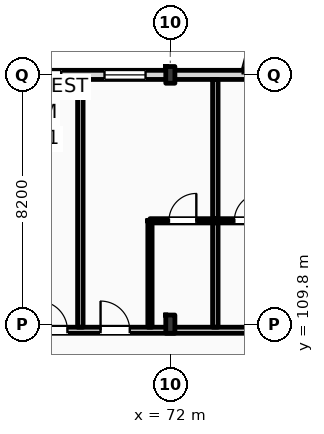
"""IFC4 building model, lengths in metres.
Left out: names, types, materials, properties, quantities, classifications, styles, units other than length and angle.
Written with IfcOpenShell. Run it as: python <this file> out.ifc"""

import sys

from ifc_helpers import new_model, si_unit, direction, frame, frame_2d, origin, origin_2d, place, context, subcontext, project, spatial, rectangle, i_section, extrude, element, fill, save


model = new_model("IFC4")
c1 = context("Model", 3, precision=1e-05, world=origin(), true_north=direction((0.0, 1.0)))
c2 = subcontext(c1, "Body", "Model", "MODEL_VIEW")
j1 = project(units=[si_unit("LENGTHUNIT", "METRE"), si_unit("PLANEANGLEUNIT", "RADIAN")], contexts=[c1])
p1 = place(None, origin())
s1 = spatial("IfcSite", under=j1, at=p1, CompositionType="ELEMENT")
p2 = place(p1, origin())
s2 = spatial("IfcBuilding", under=s1, at=p2, CompositionType="ELEMENT")
p3 = place(p2, frame((0.0, 0.0, 20.4)))
s3 = spatial("IfcBuildingStorey", under=s2, at=p3, CompositionType="ELEMENT", Elevation=20.4)
p4 = place(p3, frame((72.0, 109.8, 0.0), z_axis=(0.0, 0.0, 1.0), x_axis=(1.0, 0.0, 0.0)))
e1 = element("IfcColumn", 1, at=p4, inside=s3, PredefinedType="COLUMN", context=c2, shape_type="SweptSolid", body=[
    extrude(i_section(OverallWidth=0.3, OverallDepth=0.6, WebThickness=0.015, FlangeThickness=0.03, FilletRadius=0.027, at=origin_2d()), origin(), (0.0, 0.0, 1.0), 4.2),
])
p5 = place(p3, frame((72.0, 118.0, 0.0), z_axis=(0.0, 0.0, 1.0), x_axis=(1.0, 0.0, 0.0)))
e2 = element("IfcColumn", 2, at=p5, inside=s3, PredefinedType="COLUMN", context=c2, shape_type="SweptSolid", body=[
    extrude(i_section(OverallWidth=0.3, OverallDepth=0.55, WebThickness=0.015, FlangeThickness=0.029, FilletRadius=0.027, at=origin_2d()), origin(), (0.0, 0.0, 1.0), 4.2),
])
p6 = place(p3, frame((22.5, 118.0, 0.0), z_axis=(0.0, 0.0, 1.0), x_axis=(1.0, 0.0, 0.0)))
e3 = element("IfcWall", 3, at=p6, inside=s3, PredefinedType="STANDARD", context=c2, shape_type="SweptSolid", body=[
    extrude(rectangle(XDim=97.5, YDim=0.3, at=frame_2d((48.75, 0.0))), origin(), (0.0, 0.0, 1.0), 3.38),
])
p7 = place(p6, frame((0.91, 0.0, 0.9)))
e4 = element("IfcOpeningElement", 4, at=p7, cuts=e3, PredefinedType="OPENING", context=c2, shape_type="SweptSolid", body=[
    extrude(rectangle(XDim=0.9, YDim=1.8, at=frame_2d((0.45, 0.9))), frame((0.0, 0.16, 0.0), z_axis=(0.0, -1.0, 0.0), x_axis=(1.0, 0.0, 0.0)), (0.0, 0.0, 1.0), 0.32),
])
p8 = place(p6, frame((6.36, 0.0, 0.0)))
e5 = element("IfcOpeningElement", 5, at=p8, cuts=e3, PredefinedType="OPENING", context=c2, shape_type="SweptSolid", body=[
    extrude(rectangle(XDim=1.2, YDim=2.25, at=frame_2d((0.6, 1.125))), frame((0.0, 0.16, 0.0), z_axis=(0.0, -1.0, 0.0), x_axis=(1.0, 0.0, 0.0)), (0.0, 0.0, 1.0), 0.32),
])
p9 = place(p6, frame((11.41, 0.0, 0.9)))
e6 = element("IfcOpeningElement", 6, at=p9, cuts=e3, PredefinedType="OPENING", context=c2, shape_type="SweptSolid", body=[
    extrude(rectangle(XDim=1.1, YDim=1.9, at=frame_2d((0.55, 0.95))), frame((0.0, 0.16, 0.0), z_axis=(0.0, -1.0, 0.0), x_axis=(1.0, 0.0, 0.0)), (0.0, 0.0, 1.0), 0.32),
])
p10 = place(p6, frame((14.335, 0.0, 0.9)))
e7 = element("IfcOpeningElement", 7, at=p10, cuts=e3, PredefinedType="OPENING", context=c2, shape_type="SweptSolid", body=[
    extrude(rectangle(XDim=1.65, YDim=1.95, at=frame_2d((0.825, 0.975))), frame((0.0, 0.16, 0.0), z_axis=(0.0, -1.0, 0.0), x_axis=(1.0, 0.0, 0.0)), (0.0, 0.0, 1.0), 0.32),
])
p11 = place(p6, frame((19.26, 0.0, 0.9)))
e8 = element("IfcOpeningElement", 8, at=p11, cuts=e3, PredefinedType="OPENING", context=c2, shape_type="SweptSolid", body=[
    extrude(rectangle(XDim=1.35, YDim=2.0, at=frame_2d((0.675, 1.0))), frame((0.0, 0.16, 0.0), z_axis=(0.0, -1.0, 0.0), x_axis=(1.0, 0.0, 0.0)), (0.0, 0.0, 1.0), 0.32),
])
p12 = place(p6, frame((22.8, 0.0, 0.0)))
e9 = element("IfcOpeningElement", 9, at=p12, cuts=e3, PredefinedType="OPENING", context=c2, shape_type="SweptSolid", body=[
    extrude(rectangle(XDim=1.2, YDim=2.25, at=frame_2d((0.6, 1.125))), frame((0.0, 0.16, 0.0), z_axis=(0.0, -1.0, 0.0), x_axis=(1.0, 0.0, 0.0)), (0.0, 0.0, 1.0), 0.32),
])
p13 = place(p6, frame((26.91, 0.0, 0.9)))
e10 = element("IfcOpeningElement", 10, at=p13, cuts=e3, PredefinedType="OPENING", context=c2, shape_type="SweptSolid", body=[
    extrude(rectangle(XDim=2.1, YDim=2.1, at=frame_2d((1.05, 1.05))), frame((0.0, 0.16, 0.0), z_axis=(0.0, -1.0, 0.0), x_axis=(1.0, 0.0, 0.0)), (0.0, 0.0, 1.0), 0.32),
])
p14 = place(p6, frame((30.835, 0.0, 0.9)))
e11 = element("IfcOpeningElement", 11, at=p14, cuts=e3, PredefinedType="OPENING", context=c2, shape_type="SweptSolid", body=[
    extrude(rectangle(XDim=2.25, YDim=2.15, at=frame_2d((1.125, 1.075))), frame((0.0, 0.16, 0.0), z_axis=(0.0, -1.0, 0.0), x_axis=(1.0, 0.0, 0.0)), (0.0, 0.0, 1.0), 0.32),
])
p15 = place(p6, frame((34.96, 0.0, 0.9)))
e12 = element("IfcOpeningElement", 12, at=p15, cuts=e3, PredefinedType="OPENING", context=c2, shape_type="SweptSolid", body=[
    extrude(rectangle(XDim=2.4, YDim=2.2, at=frame_2d((1.2, 1.1))), frame((0.0, 0.16, 0.0), z_axis=(0.0, -1.0, 0.0), x_axis=(1.0, 0.0, 0.0)), (0.0, 0.0, 1.0), 0.32),
])
p16 = place(p6, frame((39.0, 0.0, 0.0)))
e13 = element("IfcOpeningElement", 13, at=p16, cuts=e3, PredefinedType="OPENING", context=c2, shape_type="SweptSolid", body=[
    extrude(rectangle(XDim=1.2, YDim=2.25, at=frame_2d((0.6, 1.125))), frame((0.0, 0.16, 0.0), z_axis=(0.0, -1.0, 0.0), x_axis=(1.0, 0.0, 0.0)), (0.0, 0.0, 1.0), 0.32),
])
p17 = place(p6, frame((43.21, 0.0, 0.9)))
e14 = element("IfcOpeningElement", 14, at=p17, cuts=e3, PredefinedType="OPENING", context=c2, shape_type="SweptSolid", body=[
    extrude(rectangle(XDim=2.7, YDim=2.3, at=frame_2d((1.35, 1.15))), frame((0.0, 0.16, 0.0), z_axis=(0.0, -1.0, 0.0), x_axis=(1.0, 0.0, 0.0)), (0.0, 0.0, 1.0), 0.32),
])
p18 = place(p6, frame((47.335, 0.0, 0.9)))
e15 = element("IfcOpeningElement", 15, at=p18, cuts=e3, PredefinedType="OPENING", context=c2, shape_type="SweptSolid", body=[
    extrude(rectangle(XDim=1.35, YDim=2.3, at=frame_2d((0.675, 1.15))), frame((0.0, 0.16, 0.0), z_axis=(0.0, -1.0, 0.0), x_axis=(1.0, 0.0, 0.0)), (0.0, 0.0, 1.0), 0.32),
])
p19 = place(p6, frame((52.74, 0.0, 0.0)))
e16 = element("IfcOpeningElement", 16, at=p19, cuts=e3, PredefinedType="OPENING", context=c2, shape_type="SweptSolid", body=[
    extrude(rectangle(XDim=1.2, YDim=2.25, at=frame_2d((0.6, 1.125))), frame((0.0, 0.16, 0.0), z_axis=(0.0, -1.0, 0.0), x_axis=(1.0, 0.0, 0.0)), (0.0, 0.0, 1.0), 0.32),
])
p20 = place(p6, frame((55.36, 0.0, 0.9)))
e17 = element("IfcOpeningElement", 17, at=p20, cuts=e3, PredefinedType="OPENING", context=c2, shape_type="SweptSolid", body=[
    extrude(rectangle(XDim=1.1, YDim=2.3, at=frame_2d((0.55, 1.15))), frame((0.0, 0.16, 0.0), z_axis=(0.0, -1.0, 0.0), x_axis=(1.0, 0.0, 0.0)), (0.0, 0.0, 1.0), 0.32),
])
p21 = place(p6, frame((59.99, 0.0, 0.9)))
e18 = element("IfcOpeningElement", 18, at=p21, cuts=e3, PredefinedType="OPENING", context=c2, shape_type="SweptSolid", body=[
    extrude(rectangle(XDim=2.74, YDim=2.3, at=frame_2d((1.37, 1.15))), frame((0.0, 0.16, 0.0), z_axis=(0.0, -1.0, 0.0), x_axis=(1.0, 0.0, 0.0)), (0.0, 0.0, 1.0), 0.32),
])
p22 = place(p6, frame((65.95, 0.0, 0.9)))
e19 = element("IfcOpeningElement", 19, at=p22, cuts=e3, PredefinedType="OPENING", context=c2, shape_type="SweptSolid", body=[
    extrude(rectangle(XDim=1.35, YDim=2.3, at=frame_2d((0.675, 1.15))), frame((0.0, 0.16, 0.0), z_axis=(0.0, -1.0, 0.0), x_axis=(1.0, 0.0, 0.0)), (0.0, 0.0, 1.0), 0.32),
])
p23 = place(p6, frame((69.16, 0.0, 0.0)))
e20 = element("IfcOpeningElement", 20, at=p23, cuts=e3, PredefinedType="OPENING", context=c2, shape_type="SweptSolid", body=[
    extrude(rectangle(XDim=1.2, YDim=2.25, at=frame_2d((0.6, 1.125))), frame((0.0, 0.16, 0.0), z_axis=(0.0, -1.0, 0.0), x_axis=(1.0, 0.0, 0.0)), (0.0, 0.0, 1.0), 0.32),
])
p24 = place(p6, frame((73.75, 0.0, 0.9)))
e21 = element("IfcOpeningElement", 21, at=p24, cuts=e3, PredefinedType="OPENING", context=c2, shape_type="SweptSolid", body=[
    extrude(rectangle(XDim=1.8, YDim=2.3, at=frame_2d((0.9, 1.15))), frame((0.0, 0.16, 0.0), z_axis=(0.0, -1.0, 0.0), x_axis=(1.0, 0.0, 0.0)), (0.0, 0.0, 1.0), 0.32),
])
p25 = place(p6, frame((76.79, 0.0, 0.9)))
e22 = element("IfcOpeningElement", 22, at=p25, cuts=e3, PredefinedType="OPENING", context=c2, shape_type="SweptSolid", body=[
    extrude(rectangle(XDim=2.74, YDim=2.3, at=frame_2d((1.37, 1.15))), frame((0.0, 0.16, 0.0), z_axis=(0.0, -1.0, 0.0), x_axis=(1.0, 0.0, 0.0)), (0.0, 0.0, 1.0), 0.32),
])
p26 = place(p6, frame((81.55, 0.0, 0.9)))
e23 = element("IfcOpeningElement", 23, at=p26, cuts=e3, PredefinedType="OPENING", context=c2, shape_type="SweptSolid", body=[
    extrude(rectangle(XDim=1.8, YDim=2.3, at=frame_2d((0.9, 1.15))), frame((0.0, 0.16, 0.0), z_axis=(0.0, -1.0, 0.0), x_axis=(1.0, 0.0, 0.0)), (0.0, 0.0, 1.0), 0.32),
])
p27 = place(p6, frame((86.01, 0.0, 0.9)))
e24 = element("IfcOpeningElement", 24, at=p27, cuts=e3, PredefinedType="OPENING", context=c2, shape_type="SweptSolid", body=[
    extrude(rectangle(XDim=1.1, YDim=1.5, at=frame_2d((0.55, 0.75))), frame((0.0, 0.16, 0.0), z_axis=(0.0, -1.0, 0.0), x_axis=(1.0, 0.0, 0.0)), (0.0, 0.0, 1.0), 0.32),
])
p28 = place(p6, frame((90.135, 0.0, 0.9)))
e25 = element("IfcOpeningElement", 25, at=p28, cuts=e3, PredefinedType="OPENING", context=c2, shape_type="SweptSolid", body=[
    extrude(rectangle(XDim=1.25, YDim=1.6, at=frame_2d((0.625, 0.8))), frame((0.0, 0.16, 0.0), z_axis=(0.0, -1.0, 0.0), x_axis=(1.0, 0.0, 0.0)), (0.0, 0.0, 1.0), 0.32),
])
p29 = place(p6, frame((94.34, 0.0, 0.9)))
e26 = element("IfcOpeningElement", 26, at=p29, cuts=e3, PredefinedType="OPENING", context=c2, shape_type="SweptSolid", body=[
    extrude(rectangle(XDim=1.4, YDim=1.7, at=frame_2d((0.7, 0.85))), frame((0.0, 0.16, 0.0), z_axis=(0.0, -1.0, 0.0), x_axis=(1.0, 0.0, 0.0)), (0.0, 0.0, 1.0), 0.32),
])
p30 = place(p3, frame((10.65, 109.6, 0.0), z_axis=(0.0, 0.0, 1.0), x_axis=(1.0, 0.0, 0.0)))
e27 = element("IfcWall", 27, at=p30, inside=s3, PredefinedType="PARTITIONING", context=c2, shape_type="SweptSolid", body=[
    extrude(rectangle(XDim=109.21, YDim=0.2, at=frame_2d((54.605, 0.0))), origin(), (0.0, 0.0, 1.0), 3.38),
])
p31 = place(p30, frame((12.535, 0.0, 0.0)))
e28 = element("IfcOpeningElement", 28, at=p31, cuts=e27, PredefinedType="OPENING", context=c2, shape_type="SweptSolid", body=[
    extrude(rectangle(XDim=1.02, YDim=2.2, at=frame_2d((0.51, 1.1))), frame((0.0, 0.11, 0.0), z_axis=(0.0, -1.0, 0.0), x_axis=(1.0, 0.0, 0.0)), (0.0, 0.0, 1.0), 0.22),
])
p32 = place(p30, frame((19.175, 0.0, 0.0)))
e29 = element("IfcOpeningElement", 29, at=p32, cuts=e27, PredefinedType="OPENING", context=c2, shape_type="SweptSolid", body=[
    extrude(rectangle(XDim=1.02, YDim=2.2, at=frame_2d((0.51, 1.1))), frame((0.0, 0.11, 0.0), z_axis=(0.0, -1.0, 0.0), x_axis=(1.0, 0.0, 0.0)), (0.0, 0.0, 1.0), 0.22),
])
p33 = place(p30, frame((23.375, 0.0, 0.0)))
e30 = element("IfcOpeningElement", 30, at=p33, cuts=e27, PredefinedType="OPENING", context=c2, shape_type="SweptSolid", body=[
    extrude(rectangle(XDim=1.02, YDim=2.2, at=frame_2d((0.51, 1.1))), frame((0.0, 0.11, 0.0), z_axis=(0.0, -1.0, 0.0), x_axis=(1.0, 0.0, 0.0)), (0.0, 0.0, 1.0), 0.22),
])
p34 = place(p30, frame((27.575, 0.0, 0.0)))
e31 = element("IfcOpeningElement", 31, at=p34, cuts=e27, PredefinedType="OPENING", context=c2, shape_type="SweptSolid", body=[
    extrude(rectangle(XDim=1.02, YDim=2.2, at=frame_2d((0.51, 1.1))), frame((0.0, 0.11, 0.0), z_axis=(0.0, -1.0, 0.0), x_axis=(1.0, 0.0, 0.0)), (0.0, 0.0, 1.0), 0.22),
])
p35 = place(p30, frame((31.805, 0.0, 0.0)))
e32 = element("IfcOpeningElement", 32, at=p35, cuts=e27, PredefinedType="OPENING", context=c2, shape_type="SweptSolid", body=[
    extrude(rectangle(XDim=0.96, YDim=2.2, at=frame_2d((0.48, 1.1))), frame((0.0, 0.11, 0.0), z_axis=(0.0, -1.0, 0.0), x_axis=(1.0, 0.0, 0.0)), (0.0, 0.0, 1.0), 0.22),
])
p36 = place(p30, frame((33.855, 0.0, 0.0)))
e33 = element("IfcOpeningElement", 33, at=p36, cuts=e27, PredefinedType="OPENING", context=c2, shape_type="SweptSolid", body=[
    extrude(rectangle(XDim=0.96, YDim=2.2, at=frame_2d((0.48, 1.1))), frame((0.0, 0.11, 0.0), z_axis=(0.0, -1.0, 0.0), x_axis=(1.0, 0.0, 0.0)), (0.0, 0.0, 1.0), 0.22),
])
p37 = place(p30, frame((40.205, 0.0, 0.0)))
e34 = element("IfcOpeningElement", 34, at=p37, cuts=e27, PredefinedType="OPENING", context=c2, shape_type="SweptSolid", body=[
    extrude(rectangle(XDim=0.96, YDim=2.2, at=frame_2d((0.48, 1.1))), frame((0.0, 0.11, 0.0), z_axis=(0.0, -1.0, 0.0), x_axis=(1.0, 0.0, 0.0)), (0.0, 0.0, 1.0), 0.22),
])
p38 = place(p30, frame((42.255, 0.0, 0.0)))
e35 = element("IfcOpeningElement", 35, at=p38, cuts=e27, PredefinedType="OPENING", context=c2, shape_type="SweptSolid", body=[
    extrude(rectangle(XDim=0.96, YDim=2.2, at=frame_2d((0.48, 1.1))), frame((0.0, 0.11, 0.0), z_axis=(0.0, -1.0, 0.0), x_axis=(1.0, 0.0, 0.0)), (0.0, 0.0, 1.0), 0.22),
])
p39 = place(p30, frame((48.605, 0.0, 0.0)))
e36 = element("IfcOpeningElement", 36, at=p39, cuts=e27, PredefinedType="OPENING", context=c2, shape_type="SweptSolid", body=[
    extrude(rectangle(XDim=0.96, YDim=2.2, at=frame_2d((0.48, 1.1))), frame((0.0, 0.11, 0.0), z_axis=(0.0, -1.0, 0.0), x_axis=(1.0, 0.0, 0.0)), (0.0, 0.0, 1.0), 0.22),
])
p40 = place(p30, frame((50.655, 0.0, 0.0)))
e37 = element("IfcOpeningElement", 37, at=p40, cuts=e27, PredefinedType="OPENING", context=c2, shape_type="SweptSolid", body=[
    extrude(rectangle(XDim=0.96, YDim=2.2, at=frame_2d((0.48, 1.1))), frame((0.0, 0.11, 0.0), z_axis=(0.0, -1.0, 0.0), x_axis=(1.0, 0.0, 0.0)), (0.0, 0.0, 1.0), 0.22),
])
p41 = place(p30, frame((57.005, 0.0, 0.0)))
e38 = element("IfcOpeningElement", 38, at=p41, cuts=e27, PredefinedType="OPENING", context=c2, shape_type="SweptSolid", body=[
    extrude(rectangle(XDim=0.96, YDim=2.2, at=frame_2d((0.48, 1.1))), frame((0.0, 0.11, 0.0), z_axis=(0.0, -1.0, 0.0), x_axis=(1.0, 0.0, 0.0)), (0.0, 0.0, 1.0), 0.22),
])
p42 = place(p30, frame((59.055, 0.0, 0.0)))
e39 = element("IfcOpeningElement", 39, at=p42, cuts=e27, PredefinedType="OPENING", context=c2, shape_type="SweptSolid", body=[
    extrude(rectangle(XDim=0.96, YDim=2.2, at=frame_2d((0.48, 1.1))), frame((0.0, 0.11, 0.0), z_axis=(0.0, -1.0, 0.0), x_axis=(1.0, 0.0, 0.0)), (0.0, 0.0, 1.0), 0.22),
])
p43 = place(p30, frame((65.405, 0.0, 0.0)))
e40 = element("IfcOpeningElement", 40, at=p43, cuts=e27, PredefinedType="OPENING", context=c2, shape_type="SweptSolid", body=[
    extrude(rectangle(XDim=0.96, YDim=2.2, at=frame_2d((0.48, 1.1))), frame((0.0, 0.11, 0.0), z_axis=(0.0, -1.0, 0.0), x_axis=(1.0, 0.0, 0.0)), (0.0, 0.0, 1.0), 0.22),
])
p44 = place(p30, frame((67.205, 0.0, 0.0)))
e41 = element("IfcOpeningElement", 41, at=p44, cuts=e27, PredefinedType="OPENING", context=c2, shape_type="SweptSolid", body=[
    extrude(rectangle(XDim=0.96, YDim=2.2, at=frame_2d((0.48, 1.1))), frame((0.0, 0.11, 0.0), z_axis=(0.0, -1.0, 0.0), x_axis=(1.0, 0.0, 0.0)), (0.0, 0.0, 1.0), 0.22),
])
p45 = place(p30, frame((73.805, 0.0, 0.0)))
e42 = element("IfcOpeningElement", 42, at=p45, cuts=e27, PredefinedType="OPENING", context=c2, shape_type="SweptSolid", body=[
    extrude(rectangle(XDim=0.96, YDim=2.2, at=frame_2d((0.48, 1.1))), frame((0.0, 0.11, 0.0), z_axis=(0.0, -1.0, 0.0), x_axis=(1.0, 0.0, 0.0)), (0.0, 0.0, 1.0), 0.22),
])
p46 = place(p30, frame((78.255, 0.0, 0.0)))
e43 = element("IfcOpeningElement", 43, at=p46, cuts=e27, PredefinedType="OPENING", context=c2, shape_type="SweptSolid", body=[
    extrude(rectangle(XDim=0.96, YDim=2.2, at=frame_2d((0.48, 1.1))), frame((0.0, 0.11, 0.0), z_axis=(0.0, -1.0, 0.0), x_axis=(1.0, 0.0, 0.0)), (0.0, 0.0, 1.0), 0.22),
])
p47 = place(p30, frame((82.205, 0.0, 0.0)))
e44 = element("IfcOpeningElement", 44, at=p47, cuts=e27, PredefinedType="OPENING", context=c2, shape_type="SweptSolid", body=[
    extrude(rectangle(XDim=0.96, YDim=2.2, at=frame_2d((0.48, 1.1))), frame((0.0, 0.11, 0.0), z_axis=(0.0, -1.0, 0.0), x_axis=(1.0, 0.0, 0.0)), (0.0, 0.0, 1.0), 0.22),
])
p48 = place(p30, frame((86.405, 0.0, 0.0)))
e45 = element("IfcOpeningElement", 45, at=p48, cuts=e27, PredefinedType="OPENING", context=c2, shape_type="SweptSolid", body=[
    extrude(rectangle(XDim=0.96, YDim=2.2, at=frame_2d((0.48, 1.1))), frame((0.0, 0.11, 0.0), z_axis=(0.0, -1.0, 0.0), x_axis=(1.0, 0.0, 0.0)), (0.0, 0.0, 1.0), 0.22),
])
p49 = place(p30, frame((90.605, 0.0, 0.0)))
e46 = element("IfcOpeningElement", 46, at=p49, cuts=e27, PredefinedType="OPENING", context=c2, shape_type="SweptSolid", body=[
    extrude(rectangle(XDim=0.96, YDim=2.2, at=frame_2d((0.48, 1.1))), frame((0.0, 0.11, 0.0), z_axis=(0.0, -1.0, 0.0), x_axis=(1.0, 0.0, 0.0)), (0.0, 0.0, 1.0), 0.22),
])
p50 = place(p30, frame((94.805, 0.0, 0.0)))
e47 = element("IfcOpeningElement", 47, at=p50, cuts=e27, PredefinedType="OPENING", context=c2, shape_type="SweptSolid", body=[
    extrude(rectangle(XDim=0.96, YDim=2.2, at=frame_2d((0.48, 1.1))), frame((0.0, 0.11, 0.0), z_axis=(0.0, -1.0, 0.0), x_axis=(1.0, 0.0, 0.0)), (0.0, 0.0, 1.0), 0.22),
])
p51 = place(p30, frame((99.005, 0.0, 0.0)))
e48 = element("IfcOpeningElement", 48, at=p51, cuts=e27, PredefinedType="OPENING", context=c2, shape_type="SweptSolid", body=[
    extrude(rectangle(XDim=0.96, YDim=2.2, at=frame_2d((0.48, 1.1))), frame((0.0, 0.11, 0.0), z_axis=(0.0, -1.0, 0.0), x_axis=(1.0, 0.0, 0.0)), (0.0, 0.0, 1.0), 0.22),
])
p52 = place(p30, frame((103.205, 0.0, 0.0)))
e49 = element("IfcOpeningElement", 49, at=p52, cuts=e27, PredefinedType="OPENING", context=c2, shape_type="SweptSolid", body=[
    extrude(rectangle(XDim=0.96, YDim=2.2, at=frame_2d((0.48, 1.1))), frame((0.0, 0.11, 0.0), z_axis=(0.0, -1.0, 0.0), x_axis=(1.0, 0.0, 0.0)), (0.0, 0.0, 1.0), 0.22),
])
p53 = place(p30, frame((105.335, 0.0, 0.0)))
e50 = element("IfcOpeningElement", 50, at=p53, cuts=e27, PredefinedType="OPENING", context=c2, shape_type="SweptSolid", body=[
    extrude(rectangle(XDim=0.96, YDim=2.2, at=frame_2d((0.48, 1.1))), frame((0.0, 0.11, 0.0), z_axis=(0.0, -1.0, 0.0), x_axis=(1.0, 0.0, 0.0)), (0.0, 0.0, 1.0), 0.22),
])
p54 = place(p30, frame((2.716, 0.0, 0.0)))
e51 = element("IfcOpeningElement", 51, at=p54, cuts=e27, PredefinedType="OPENING", context=c2, shape_type="SweptSolid", body=[
    extrude(rectangle(XDim=1.35, YDim=2.25, at=frame_2d((0.675, 1.125))), frame((0.0, 0.11, 0.0), z_axis=(0.0, -1.0, 0.0), x_axis=(1.0, 0.0, 0.0)), (0.0, 0.0, 1.0), 0.22),
])
p55 = place(p30, frame((6.65, 0.0, 0.0)))
e52 = element("IfcOpeningElement", 52, at=p55, cuts=e27, PredefinedType="OPENING", context=c2, shape_type="SweptSolid", body=[
    extrude(rectangle(XDim=1.35, YDim=2.25, at=frame_2d((0.675, 1.125))), frame((0.0, 0.11, 0.0), z_axis=(0.0, -1.0, 0.0), x_axis=(1.0, 0.0, 0.0)), (0.0, 0.0, 1.0), 0.22),
])
p56 = place(p30, frame((10.583, 0.0, 0.0)))
e53 = element("IfcOpeningElement", 53, at=p56, cuts=e27, PredefinedType="OPENING", context=c2, shape_type="SweptSolid", body=[
    extrude(rectangle(XDim=1.35, YDim=2.25, at=frame_2d((0.675, 1.125))), frame((0.0, 0.11, 0.0), z_axis=(0.0, -1.0, 0.0), x_axis=(1.0, 0.0, 0.0)), (0.0, 0.0, 1.0), 0.22),
])
for number, where, z_axis, x_axis in (
    (54, (69.04, 109.7, 0.0), (0.0, 0.0, 1.0), (0.0, 1.0, 0.0)),
    (55, (73.48, 109.7, 0.0), (0.0, 0.0, 1.0), (0.0, 1.0, 0.0)),
):
    element("IfcWall", number, at=place(p3, frame(where, z_axis=z_axis, x_axis=x_axis)), inside=s3, PredefinedType="PARTITIONING", context=c2, shape_type="SweptSolid", body=[
        extrude(rectangle(XDim=8.15, YDim=0.18, at=frame_2d((4.075, 0.0))), origin(), (0.0, 0.0, 1.0), 3.94),
    ])
p57 = place(p3, frame((71.33, 109.7, 0.0), z_axis=(0.0, 0.0, 1.0), x_axis=(0.0, 1.0, 0.0)))
e56 = element("IfcWall", 56, at=p57, inside=s3, PredefinedType="PARTITIONING", context=c2, shape_type="SweptSolid", body=[
    extrude(rectangle(XDim=3.5, YDim=0.14, at=frame_2d((1.75, 0.0))), origin(), (0.0, 0.0, 1.0), 3.94),
])
p58 = place(p3, frame((71.33, 113.2, 0.0), z_axis=(0.0, 0.0, 1.0), x_axis=(1.0, 0.0, 0.0)))
e57 = element("IfcWall", 57, at=p58, inside=s3, PredefinedType="PARTITIONING", context=c2, shape_type="SweptSolid", body=[
    extrude(rectangle(XDim=2.15, YDim=0.14, at=frame_2d((1.075, 0.0))), origin(), (0.0, 0.0, 1.0), 3.94),
])
p59 = place(p58, frame((0.625, 0.0, 0.0)))
e58 = element("IfcOpeningElement", 58, at=p59, cuts=e57, PredefinedType="OPENING", context=c2, shape_type="SweptSolid", body=[
    extrude(rectangle(XDim=0.9, YDim=2.1, at=frame_2d((0.45, 1.05))), frame((0.0, 0.08, 0.0), z_axis=(0.0, -1.0, 0.0), x_axis=(1.0, 0.0, 0.0)), (0.0, 0.0, 1.0), 0.16),
])
p60 = place(p3, frame((73.48, 113.2, 0.0), z_axis=(0.0, 0.0, 1.0), x_axis=(1.0, 0.0, 0.0)))
e59 = element("IfcWall", 59, at=p60, inside=s3, PredefinedType="PARTITIONING", context=c2, shape_type="SweptSolid", body=[
    extrude(rectangle(XDim=2.15, YDim=0.14, at=frame_2d((1.075, 0.0))), origin(), (0.0, 0.0, 1.0), 3.94),
])
p61 = place(p60, frame((0.625, 0.0, 0.0)))
e60 = element("IfcOpeningElement", 60, at=p61, cuts=e59, PredefinedType="OPENING", context=c2, shape_type="SweptSolid", body=[
    extrude(rectangle(XDim=0.9, YDim=2.1, at=frame_2d((0.45, 1.05))), frame((0.0, 0.08, 0.0), z_axis=(0.0, -1.0, 0.0), x_axis=(1.0, 0.0, 0.0)), (0.0, 0.0, 1.0), 0.16),
])
p62 = place(p17, origin())
e61 = element("IfcWindow", 61, at=p62, inside=s3, PartitioningType="DOUBLE_PANEL_VERTICAL", PredefinedType="WINDOW", context=c2, shape_type="SweptSolid", body=[
    extrude(rectangle(XDim=2.7, YDim=2.3, at=frame_2d((1.35, 1.15))), frame((0.0, 0.03, 0.0), z_axis=(0.0, -1.0, 0.0), x_axis=(1.0, 0.0, 0.0)), (0.0, 0.0, 1.0), 0.06),
])
fill(e14, e61)
p63 = place(p18, origin())
e62 = element("IfcWindow", 62, at=p63, inside=s3, PartitioningType="DOUBLE_PANEL_VERTICAL", PredefinedType="WINDOW", context=c2, shape_type="SweptSolid", body=[
    extrude(rectangle(XDim=1.35, YDim=2.3, at=frame_2d((0.675, 1.15))), frame((0.0, 0.03, 0.0), z_axis=(0.0, -1.0, 0.0), x_axis=(1.0, 0.0, 0.0)), (0.0, 0.0, 1.0), 0.06),
])
fill(e15, e62)
p64 = place(p41, origin())
e63 = element("IfcDoor", 63, at=p64, inside=s3, OperationType="SINGLE_SWING_LEFT", PredefinedType="DOOR", context=c2, shape_type="SweptSolid", body=[
    extrude(rectangle(XDim=0.96, YDim=2.2, at=frame_2d((0.48, 1.1))), frame((0.0, 0.025, 0.0), z_axis=(0.0, -1.0, 0.0), x_axis=(1.0, 0.0, 0.0)), (0.0, 0.0, 1.0), 0.05),
])
fill(e38, e63)
p65 = place(p42, origin())
e64 = element("IfcDoor", 64, at=p65, inside=s3, OperationType="SINGLE_SWING_LEFT", PredefinedType="DOOR", context=c2, shape_type="SweptSolid", body=[
    extrude(rectangle(XDim=0.96, YDim=2.2, at=frame_2d((0.48, 1.1))), frame((0.0, 0.025, 0.0), z_axis=(0.0, -1.0, 0.0), x_axis=(1.0, 0.0, 0.0)), (0.0, 0.0, 1.0), 0.05),
])
fill(e39, e64)
p66 = place(p59, origin())
e65 = element("IfcDoor", 65, at=p66, inside=s3, OperationType="SINGLE_SWING_RIGHT", PredefinedType="DOOR", context=c2, shape_type="SweptSolid", body=[
    extrude(rectangle(XDim=0.9, YDim=2.1, at=frame_2d((0.45, 1.05))), frame((0.0, 0.025, 0.0), z_axis=(0.0, -1.0, 0.0), x_axis=(1.0, 0.0, 0.0)), (0.0, 0.0, 1.0), 0.05),
])
fill(e58, e65)
p67 = place(p61, origin())
e66 = element("IfcDoor", 66, at=p67, inside=s3, OperationType="SINGLE_SWING_RIGHT", PredefinedType="DOOR", context=c2, shape_type="SweptSolid", body=[
    extrude(rectangle(XDim=0.9, YDim=2.1, at=frame_2d((0.45, 1.05))), frame((0.0, 0.025, 0.0), z_axis=(0.0, -1.0, 0.0), x_axis=(1.0, 0.0, 0.0)), (0.0, 0.0, 1.0), 0.05),
])
fill(e60, e66)
save(model, sys.argv[1])
